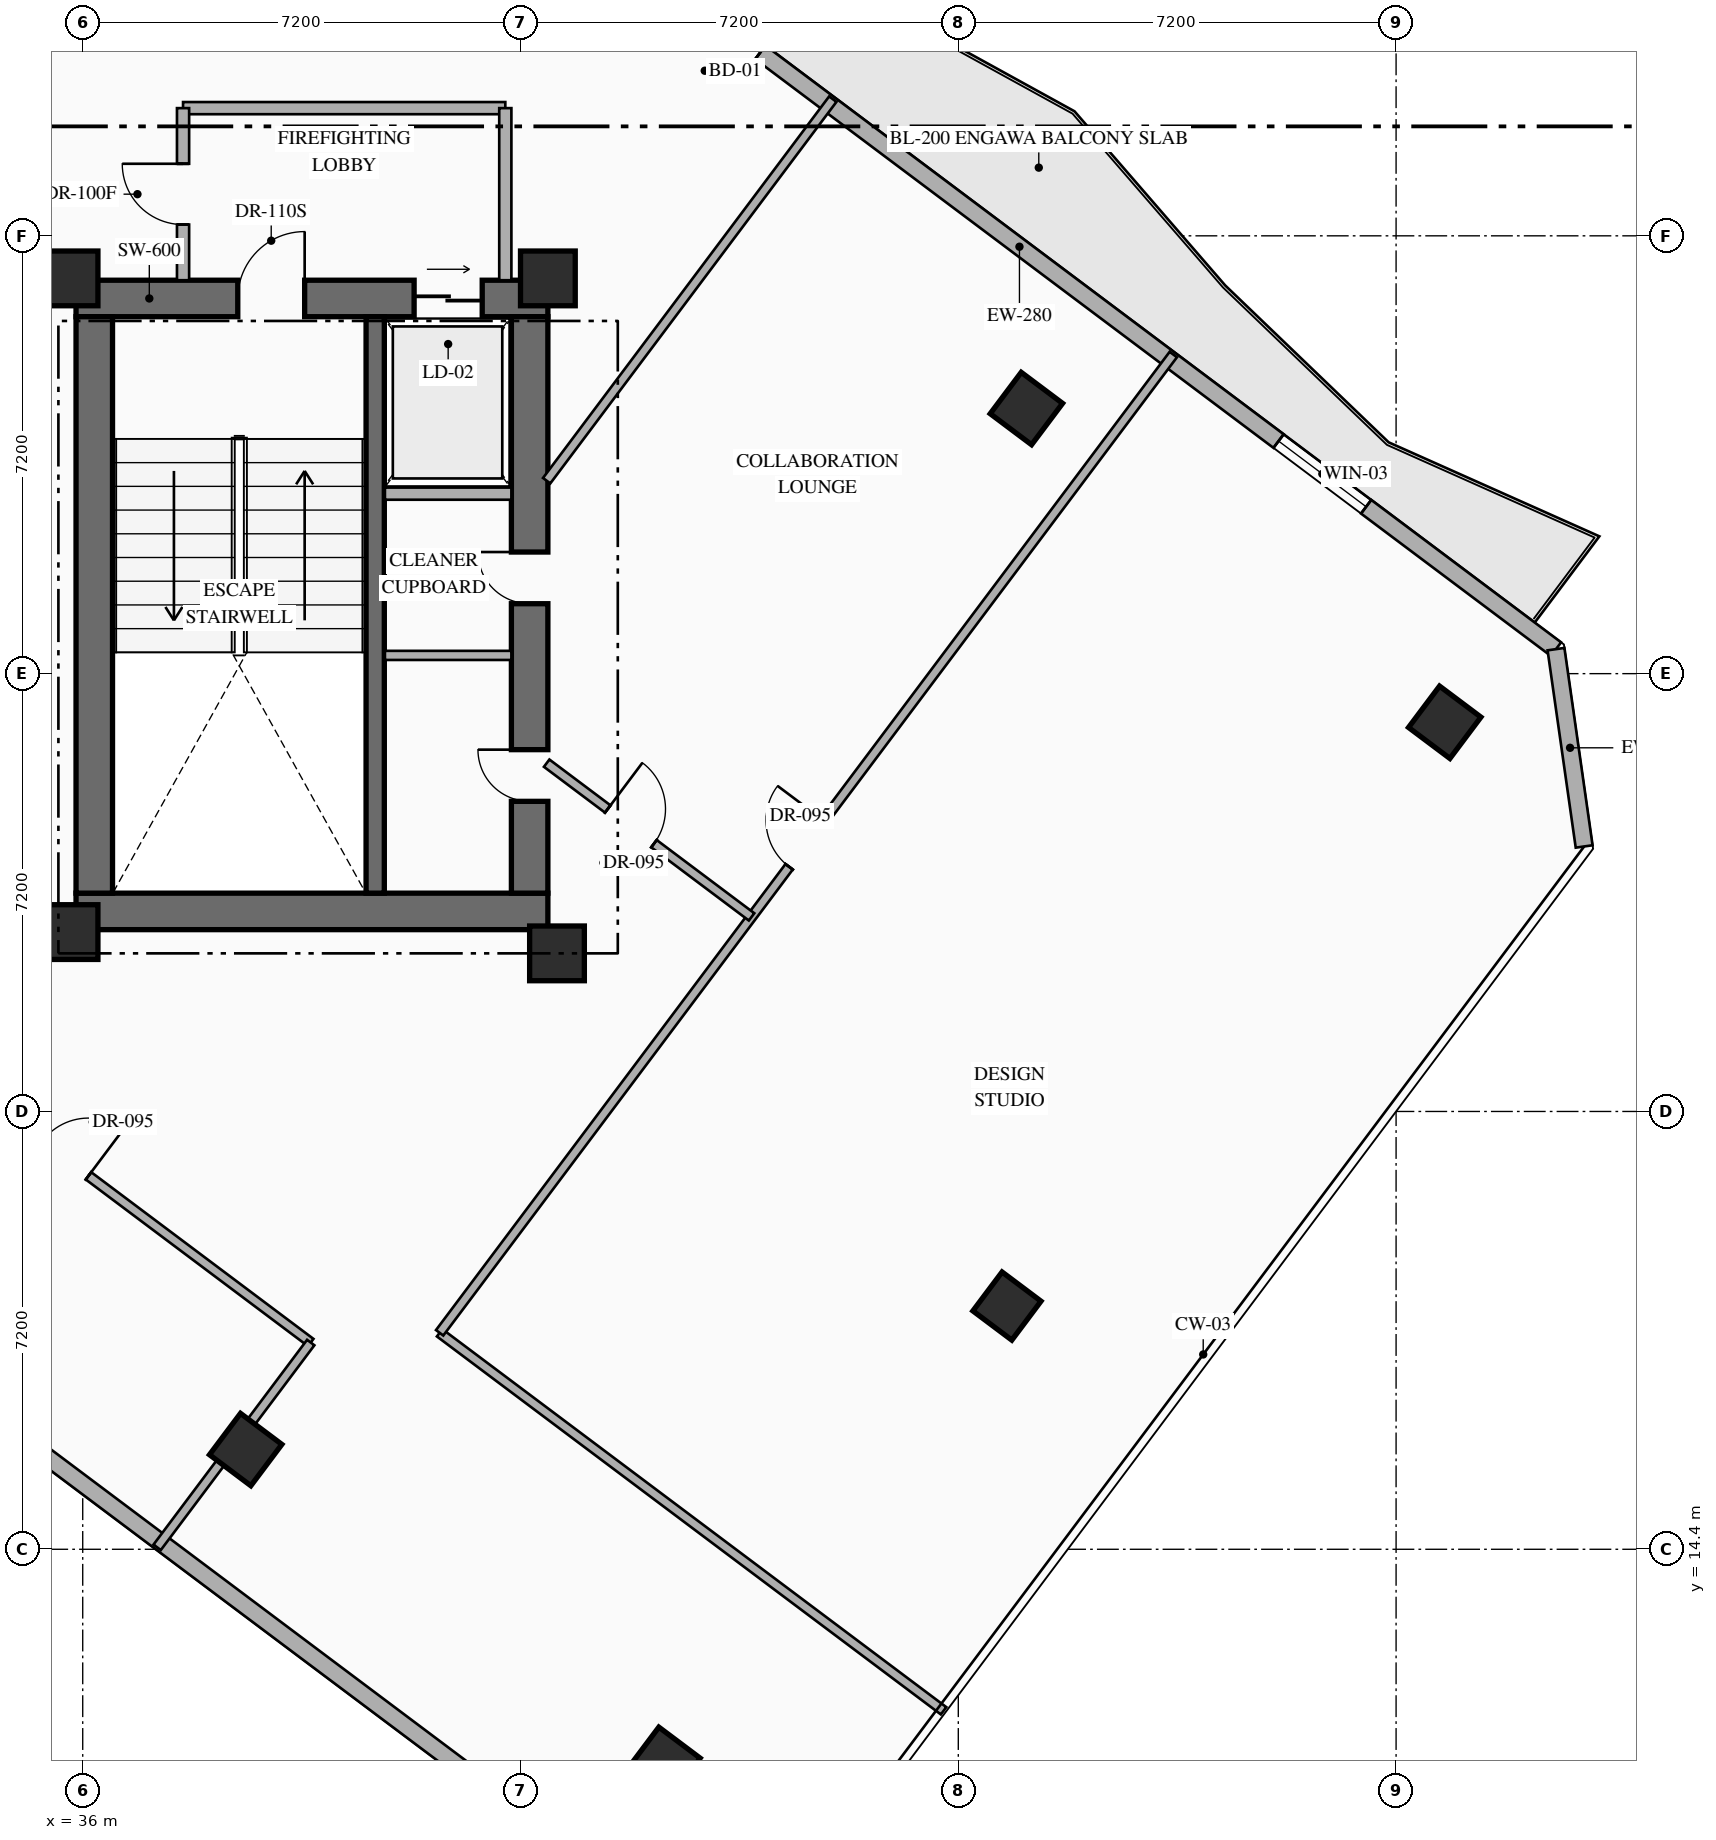
"""IFC4 building model, lengths in metres.
Left out: names, types, materials, properties, quantities, classifications, styles, units other than length and angle.
Written with IfcOpenShell. Run it as: python <this file> out.ifc"""

import sys

from ifc_helpers import new_model, si_unit, direction, frame, frame_2d, origin, origin_2d, place, context, subcontext, project, spatial, rectangle, hollow_rectangle, extrude, element, fill, save


model = new_model("IFC4")
c1 = context("Model", 3, precision=1e-05, world=origin(), true_north=direction((0.0, 1.0)))
c2 = subcontext(c1, "Body", "Model", "MODEL_VIEW")
j1 = project(units=[si_unit("LENGTHUNIT", "METRE"), si_unit("PLANEANGLEUNIT", "RADIAN")], contexts=[c1])
p1 = place(None, origin())
s1 = spatial("IfcSite", under=j1, at=p1, CompositionType="ELEMENT")
p2 = place(p1, origin())
s2 = spatial("IfcBuilding", under=s1, at=p2, CompositionType="ELEMENT")
p3 = place(p2, frame((0.0, 0.0, 152.85)))
s3 = spatial("IfcBuildingStorey", under=s2, at=p3, CompositionType="ELEMENT", Elevation=152.85)
p4 = place(p3, frame((35.89, 24.89, 0.0), z_axis=(0.0, 0.0, 1.0), x_axis=(1.0, 0.0, 0.0)))
e1 = element("IfcWall", 1, at=p4, inside=s3, PredefinedType="SHEAR", context=c2, shape_type="SweptSolid", body=[
    extrude(rectangle(XDim=7.76, YDim=0.6, at=frame_2d((3.88, 0.0))), origin(), (0.0, 0.0, 1.0), 3.6),
])
p5 = place(p3, frame((35.89, 34.97, 0.0), z_axis=(0.0, 0.0, 1.0), x_axis=(1.0, 0.0, 0.0)))
e2 = element("IfcWall", 2, at=p5, inside=s3, PredefinedType="SHEAR", context=c2, shape_type="SweptSolid", body=[
    extrude(rectangle(XDim=7.76, YDim=0.6, at=frame_2d((3.88, 0.0))), origin(), (0.0, 0.0, 1.0), 3.6),
])
p6 = place(p5, frame((2.66, 0.0, 0.0)))
e3 = element("IfcOpeningElement", 3, at=p6, cuts=e2, PredefinedType="OPENING", context=c2, shape_type="SweptSolid", body=[
    extrude(rectangle(XDim=1.1, YDim=2.2, at=frame_2d((0.55, 1.1))), frame((0.0, 0.31, 0.0), z_axis=(0.0, -1.0, 0.0), x_axis=(1.0, 0.0, 0.0)), (0.0, 0.0, 1.0), 0.62),
])
p7 = place(p5, frame((5.56, 0.0, 0.0)))
e4 = element("IfcOpeningElement", 4, at=p7, cuts=e2, PredefinedType="OPENING", context=c2, shape_type="SweptSolid", body=[
    extrude(rectangle(XDim=1.12, YDim=2.15, at=frame_2d((0.56, 1.075))), frame((0.0, 0.31, 0.0), z_axis=(0.0, -1.0, 0.0), x_axis=(1.0, 0.0, 0.0)), (0.0, 0.0, 1.0), 0.62),
])
p8 = place(p3, frame((36.19, 25.19, 0.0), z_axis=(0.0, 0.0, 1.0), x_axis=(0.0, 1.0, 0.0)))
e5 = element("IfcWall", 5, at=p8, inside=s3, PredefinedType="SHEAR", context=c2, shape_type="SweptSolid", body=[
    extrude(rectangle(XDim=9.48, YDim=0.6, at=frame_2d((4.74, 0.0))), origin(), (0.0, 0.0, 1.0), 3.6),
])
p9 = place(p3, frame((43.35, 25.19, 0.0), z_axis=(0.0, 0.0, 1.0), x_axis=(0.0, 1.0, 0.0)))
e6 = element("IfcWall", 6, at=p9, inside=s3, PredefinedType="SHEAR", context=c2, shape_type="SweptSolid", body=[
    extrude(rectangle(XDim=9.48, YDim=0.6, at=frame_2d((4.74, 0.0))), origin(), (0.0, 0.0, 1.0), 3.6),
])
p10 = place(p9, frame((1.51, 0.0, 0.0)))
e7 = element("IfcOpeningElement", 7, at=p10, cuts=e6, PredefinedType="OPENING", context=c2, shape_type="SweptSolid", body=[
    extrude(rectangle(XDim=0.85, YDim=2.08, at=frame_2d((0.425, 1.04))), frame((0.0, 0.31, 0.0), z_axis=(0.0, -1.0, 0.0), x_axis=(1.0, 0.0, 0.0)), (0.0, 0.0, 1.0), 0.62),
])
p11 = place(p9, frame((4.76, 0.0, 0.0)))
e8 = element("IfcOpeningElement", 8, at=p11, cuts=e6, PredefinedType="OPENING", context=c2, shape_type="SweptSolid", body=[
    extrude(rectangle(XDim=0.85, YDim=2.08, at=frame_2d((0.425, 1.04))), frame((0.0, 0.31, 0.0), z_axis=(0.0, -1.0, 0.0), x_axis=(1.0, 0.0, 0.0)), (0.0, 0.0, 1.0), 0.62),
])
p12 = place(p3, frame((40.81, 25.19, 0.0), z_axis=(0.0, 0.0, 1.0), x_axis=(0.0, 1.0, 0.0)))
e9 = element("IfcWall", 9, at=p12, inside=s3, PredefinedType="SHEAR", context=c2, shape_type="SweptSolid", body=[
    extrude(rectangle(XDim=9.48, YDim=0.3, at=frame_2d((4.74, 0.0))), origin(), (0.0, 0.0, 1.0), 3.6),
])
for number, where, z_axis, x_axis in (
    (10, (35.8, 24.55, 0.0), (0.0, 0.0, 1.0), (1.0, 0.0, 0.0)),
    (11, (43.8, 24.2, 0.0), (0.0, 0.0, 1.0), (1.0, 0.0, 0.0)),
    (12, (35.8, 35.3, 0.0), (0.0, 0.0, 1.0), (1.0, 0.0, 0.0)),
    (13, (43.65, 35.3, 0.0), (0.0, 0.0, 1.0), (1.0, 0.0, 0.0)),
):
    element("IfcColumn", number, at=place(p3, frame(where, z_axis=z_axis, x_axis=x_axis)), inside=s3, PredefinedType="COLUMN", context=c2, shape_type="SweptSolid", body=[
        extrude(rectangle(XDim=0.9, YDim=0.9, at=origin_2d()), origin(), (0.0, 0.0, 1.0), 3.6),
    ])
for number, where, z_axis, x_axis in (
    (14, (38.68, 16.04, 0.0), (0.0, 0.0, 1.0), (0.8, -0.6, 0.0)),
    (15, (51.52, 33.16, 0.0), (0.0, 0.0, 1.0), (0.8, -0.6, 0.0)),
    (16, (45.56, 10.88, 0.0), (0.0, 0.0, 1.0), (0.8, -0.6, 0.0)),
    (17, (58.4, 28.0, 0.0), (0.0, 0.0, 1.0), (0.8, -0.6, 0.0)),
):
    element("IfcColumn", number, at=place(p3, frame(where, z_axis=z_axis, x_axis=x_axis)), inside=s3, PredefinedType="COLUMN", context=c2, shape_type="SweptSolid", body=[
        extrude(hollow_rectangle(XDim=0.85, YDim=0.85, WallThickness=0.032, at=origin_2d()), origin(), (0.0, 0.0, 1.0), 3.6),
    ])
p13 = place(p3, frame((51.2, 18.4, 0.0), z_axis=(0.0, 0.0, 1.0), x_axis=(0.799999996291, -0.600000004945, 0.0)))
e18 = element("IfcColumn", 18, at=p13, inside=s3, PredefinedType="COLUMN", context=c2, shape_type="SweptSolid", body=[
    extrude(hollow_rectangle(XDim=0.8, YDim=0.8, WallThickness=0.032, at=origin_2d()), origin(), (0.0, 0.0, 1.0), 3.6),
])
p14 = place(p3, frame((44.86, 40.73, 0.0), z_axis=(0.0, 0.0, 1.0), x_axis=(0.800007624502, -0.599989833863, 0.0)))
e19 = element("IfcWall", 19, at=p14, inside=s3, PredefinedType="STANDARD", context=c2, shape_type="SweptSolid", body=[
    extrude(rectangle(XDim=19.212, YDim=0.28, at=frame_2d((9.606, 0.0))), origin(), (0.0, 0.0, 1.0), 3.35),
])
p15 = place(p14, frame((1.755, 0.0, 0.0)))
e20 = element("IfcOpeningElement", 20, at=p15, cuts=e19, PredefinedType="OPENING", context=c2, shape_type="SweptSolid", body=[
    extrude(rectangle(XDim=1.1, YDim=2.2, at=frame_2d((0.55, 1.1))), frame((0.0, 0.15, 0.0), z_axis=(0.0, -1.0, 0.0), x_axis=(1.0, 0.0, 0.0)), (0.0, 0.0, 1.0), 0.3),
])
p16 = place(p14, frame((13.509, 0.0, 0.85)))
e21 = element("IfcOpeningElement", 21, at=p16, cuts=e19, PredefinedType="OPENING", context=c2, shape_type="SweptSolid", body=[
    extrude(rectangle(XDim=1.8, YDim=2.1, at=frame_2d((0.9, 1.05))), frame((0.0, 0.15, 0.0), z_axis=(0.0, -1.0, 0.0), x_axis=(1.0, 0.0, 0.0)), (0.0, 0.0, 1.0), 0.3),
])
p17 = place(p3, frame((60.23, 29.203, 0.0), z_axis=(0.0, 0.0, 1.0), x_axis=(0.141296221922, -0.989967361922, 0.0)))
e22 = element("IfcWall", 22, at=p17, inside=s3, PredefinedType="STANDARD", context=c2, shape_type="SweptSolid", body=[
    extrude(rectangle(XDim=3.278, YDim=0.28, at=frame_2d((1.639, 0.0))), origin(), (0.0, 0.0, 1.0), 3.35),
])
p18 = place(p3, frame((44.918, 8.787, 0.0), z_axis=(0.0, 0.0, 1.0), x_axis=(-0.800004765927, 0.599993645378, 0.0)))
e23 = element("IfcWall", 23, at=p18, inside=s3, PredefinedType="STANDARD", context=c2, shape_type="SweptSolid", body=[
    extrude(rectangle(XDim=24.588, YDim=0.28, at=frame_2d((12.294, 0.0))), origin(), (0.0, 0.0, 1.0), 3.35),
])
p19 = place(p3, frame((40.97, 31.76, 0.0), z_axis=(0.0, 0.0, 1.0), x_axis=(1.0, 0.0, 0.0)))
e24 = element("IfcWall", 24, at=p19, inside=s3, PredefinedType="STANDARD", context=c2, shape_type="SweptSolid", body=[
    extrude(rectangle(XDim=2.08, YDim=0.2, at=frame_2d((1.04, 0.0))), origin(), (0.0, 0.0, 1.0), 3.35),
])
p20 = place(p3, frame((40.97, 29.1, 0.0), z_axis=(0.0, 0.0, 1.0), x_axis=(1.0, 0.0, 0.0)))
e25 = element("IfcWall", 25, at=p20, inside=s3, PredefinedType="PARTITIONING", context=c2, shape_type="SweptSolid", body=[
    extrude(rectangle(XDim=2.08, YDim=0.15, at=frame_2d((1.04, 0.0))), origin(), (0.0, 0.0, 1.0), 3.35),
])
p21 = place(p3, frame((37.65, 38.1, 0.0), z_axis=(0.0, 0.0, 1.0), x_axis=(1.0, 0.0, 0.0)))
e26 = element("IfcWall", 26, at=p21, inside=s3, PredefinedType="STANDARD", context=c2, shape_type="SweptSolid", body=[
    extrude(rectangle(XDim=5.3, YDim=0.2, at=frame_2d((2.65, 0.0))), origin(), (0.0, 0.0, 1.0), 3.35),
])
p22 = place(p3, frame((42.95, 35.27, 0.0), z_axis=(0.0, 0.0, 1.0), x_axis=(0.0, 1.0, 0.0)))
e27 = element("IfcWall", 27, at=p22, inside=s3, PredefinedType="STANDARD", context=c2, shape_type="SweptSolid", body=[
    extrude(rectangle(XDim=2.83, YDim=0.2, at=frame_2d((1.415, 0.0))), origin(), (0.0, 0.0, 1.0), 3.35),
])
p23 = place(p3, frame((37.65, 35.27, 0.0), z_axis=(0.0, 0.0, 1.0), x_axis=(0.0, 1.0, 0.0)))
e28 = element("IfcWall", 28, at=p23, inside=s3, PredefinedType="STANDARD", context=c2, shape_type="SweptSolid", body=[
    extrude(rectangle(XDim=2.83, YDim=0.2, at=frame_2d((1.415, 0.0))), origin(), (0.0, 0.0, 1.0), 3.35),
])
p24 = place(p23, frame((0.915, 0.0, 0.0)))
e29 = element("IfcOpeningElement", 29, at=p24, cuts=e28, PredefinedType="OPENING", context=c2, shape_type="SweptSolid", body=[
    extrude(rectangle(XDim=1.0, YDim=2.2, at=frame_2d((0.5, 1.1))), frame((0.0, 0.11, 0.0), z_axis=(0.0, -1.0, 0.0), x_axis=(1.0, 0.0, 0.0)), (0.0, 0.0, 1.0), 0.22),
])
p25 = place(p3, frame((41.87, 17.96, 0.0), z_axis=(0.0, 0.0, 1.0), x_axis=(0.799991516197, -0.600011311571, 0.0)))
e30 = element("IfcWall", 30, at=p25, inside=s3, PredefinedType="PARTITIONING", context=c2, shape_type="SweptSolid", body=[
    extrude(rectangle(XDim=10.36, YDim=0.15, at=frame_2d((5.18, 0.0))), origin(), (0.0, 0.0, 1.0), 3.35),
])
p26 = place(p3, frame((41.87, 17.96, 0.0), z_axis=(0.0, 0.0, 1.0), x_axis=(0.599994172676, 0.80000437046, 0.0)))
e31 = element("IfcWall", 31, at=p26, inside=s3, PredefinedType="PARTITIONING", context=c2, shape_type="SweptSolid", body=[
    extrude(rectangle(XDim=20.11, YDim=0.15, at=frame_2d((10.055, 0.0))), origin(), (0.0, 0.0, 1.0), 3.35),
])
p27 = place(p26, frame((9.58, 0.0, 0.0)))
e32 = element("IfcOpeningElement", 32, at=p27, cuts=e31, PredefinedType="OPENING", context=c2, shape_type="SweptSolid", body=[
    extrude(rectangle(XDim=0.95, YDim=2.15, at=frame_2d((0.475, 1.075))), frame((0.0, 0.085, 0.0), z_axis=(0.0, -1.0, 0.0), x_axis=(1.0, 0.0, 0.0)), (0.0, 0.0, 1.0), 0.17),
])
p28 = place(p3, frame((43.63, 27.328, 0.0), z_axis=(0.0, 0.0, 1.0), x_axis=(0.799972182084, -0.600037088764, 0.0)))
e33 = element("IfcWall", 33, at=p28, inside=s3, PredefinedType="PARTITIONING", context=c2, shape_type="SweptSolid", body=[
    extrude(rectangle(XDim=4.213, YDim=0.15, at=frame_2d((2.106, 0.0))), origin(), (0.0, 0.0, 1.0), 3.045),
])
p29 = place(p28, frame((1.256, 0.0, 0.0)))
e34 = element("IfcOpeningElement", 34, at=p29, cuts=e33, PredefinedType="OPENING", context=c2, shape_type="SweptSolid", body=[
    extrude(rectangle(XDim=0.95, YDim=2.15, at=frame_2d((0.475, 1.075))), frame((0.0, 0.085, 0.0), z_axis=(0.0, -1.0, 0.0), x_axis=(1.0, 0.0, 0.0)), (0.0, 0.0, 1.0), 0.17),
])
p30 = place(p3, frame((43.63, 31.973, 0.0), z_axis=(0.0, 0.0, 1.0), x_axis=(0.599975099311, 0.800018674911, 0.0)))
e35 = element("IfcWall", 35, at=p30, inside=s3, PredefinedType="PARTITIONING", context=c2, shape_type="SweptSolid", body=[
    extrude(rectangle(XDim=7.844, YDim=0.15, at=frame_2d((3.922, 0.0))), origin(), (0.0, 0.0, 1.0), 3.35),
])
p31 = place(p3, frame((27.91, 26.68, 0.0), z_axis=(0.0, 0.0, 1.0), x_axis=(0.800005938517, -0.599992081896, 0.0)))
e36 = element("IfcWall", 36, at=p31, inside=s3, PredefinedType="PARTITIONING", context=c2, shape_type="SweptSolid", body=[
    extrude(rectangle(XDim=14.8, YDim=0.15, at=frame_2d((7.4, 0.0))), origin(), (0.0, 0.0, 1.0), 3.35),
])
p32 = place(p31, frame((9.281, 0.0, 0.0)))
e37 = element("IfcOpeningElement", 37, at=p32, cuts=e36, PredefinedType="OPENING", context=c2, shape_type="SweptSolid", body=[
    extrude(rectangle(XDim=0.95, YDim=2.15, at=frame_2d((0.475, 1.075))), frame((0.0, 0.085, 0.0), z_axis=(0.0, -1.0, 0.0), x_axis=(1.0, 0.0, 0.0)), (0.0, 0.0, 1.0), 0.17),
])
p33 = place(p3, frame((37.224, 14.432, 0.0), z_axis=(0.0, 0.0, 1.0), x_axis=(0.599962885857, 0.800027834262, 0.0)))
e38 = element("IfcWall", 38, at=p33, inside=s3, PredefinedType="PARTITIONING", context=c2, shape_type="SweptSolid", body=[
    extrude(rectangle(XDim=4.21, YDim=0.15, at=frame_2d((2.105, 0.0))), origin(), (0.0, 0.0, 1.0), 2.695),
])
p34 = place(p15, origin())
e39 = element("IfcDoor", 39, at=p34, inside=s3, OperationType="SINGLE_SWING_LEFT", PredefinedType="DOOR", context=c2, shape_type="SweptSolid", body=[
    extrude(rectangle(XDim=1.1, YDim=2.2, at=frame_2d((0.55, 1.1))), frame((0.0, 0.025, 0.0), z_axis=(0.0, -1.0, 0.0), x_axis=(1.0, 0.0, 0.0)), (0.0, 0.0, 1.0), 0.05),
])
fill(e20, e39)
p35 = place(p16, origin())
e40 = element("IfcWindow", 40, at=p35, inside=s3, PartitioningType="SINGLE_PANEL", PredefinedType="WINDOW", context=c2, shape_type="SweptSolid", body=[
    extrude(rectangle(XDim=1.8, YDim=2.1, at=frame_2d((0.9, 1.05))), frame((0.0, 0.03, 0.0), z_axis=(0.0, -1.0, 0.0), x_axis=(1.0, 0.0, 0.0)), (0.0, 0.0, 1.0), 0.06),
])
fill(e21, e40)
p36 = place(p6, origin())
e41 = element("IfcDoor", 41, at=p36, inside=s3, OperationType="SINGLE_SWING_RIGHT", PredefinedType="DOOR", context=c2, shape_type="SweptSolid", body=[
    extrude(rectangle(XDim=1.1, YDim=2.2, at=frame_2d((0.55, 1.1))), frame((0.0, 0.025, 0.0), z_axis=(0.0, -1.0, 0.0), x_axis=(1.0, 0.0, 0.0)), (0.0, 0.0, 1.0), 0.05),
])
fill(e3, e41)
p37 = place(p7, origin())
e42 = element("IfcDoor", 42, at=p37, inside=s3, OperationType="SLIDING_TO_RIGHT", PredefinedType="USERDEFINED", context=c2, shape_type="SweptSolid", body=[
    extrude(rectangle(XDim=1.12, YDim=2.15, at=frame_2d((0.56, 1.075))), frame((0.0, 0.025, 0.0), z_axis=(0.0, -1.0, 0.0), x_axis=(1.0, 0.0, 0.0)), (0.0, 0.0, 1.0), 0.05),
])
fill(e4, e42)
p38 = place(p10, origin())
e43 = element("IfcDoor", 43, at=p38, inside=s3, OperationType="SINGLE_SWING_RIGHT", PredefinedType="DOOR", context=c2, shape_type="SweptSolid", body=[
    extrude(rectangle(XDim=0.85, YDim=2.08, at=frame_2d((0.425, 1.04))), frame((0.0, 0.025, 0.0), z_axis=(0.0, -1.0, 0.0), x_axis=(1.0, 0.0, 0.0)), (0.0, 0.0, 1.0), 0.05),
])
fill(e7, e43)
p39 = place(p11, origin())
e44 = element("IfcDoor", 44, at=p39, inside=s3, OperationType="SINGLE_SWING_RIGHT", PredefinedType="DOOR", context=c2, shape_type="SweptSolid", body=[
    extrude(rectangle(XDim=0.85, YDim=2.08, at=frame_2d((0.425, 1.04))), frame((0.0, 0.025, 0.0), z_axis=(0.0, -1.0, 0.0), x_axis=(1.0, 0.0, 0.0)), (0.0, 0.0, 1.0), 0.05),
])
fill(e8, e44)
p40 = place(p24, origin())
e45 = element("IfcDoor", 45, at=p40, inside=s3, OperationType="SINGLE_SWING_RIGHT", PredefinedType="DOOR", context=c2, shape_type="SweptSolid", body=[
    extrude(rectangle(XDim=1.0, YDim=2.2, at=frame_2d((0.5, 1.1))), frame((0.0, 0.025, 0.0), z_axis=(0.0, -1.0, 0.0), x_axis=(1.0, 0.0, 0.0)), (0.0, 0.0, 1.0), 0.05),
])
fill(e29, e45)
p41 = place(p27, origin())
e46 = element("IfcDoor", 46, at=p41, inside=s3, OperationType="SINGLE_SWING_RIGHT", PredefinedType="DOOR", context=c2, shape_type="SweptSolid", body=[
    extrude(rectangle(XDim=0.95, YDim=2.15, at=frame_2d((0.475, 1.075))), frame((0.0, 0.025, 0.0), z_axis=(0.0, -1.0, 0.0), x_axis=(1.0, 0.0, 0.0)), (0.0, 0.0, 1.0), 0.05),
])
fill(e32, e46)
p42 = place(p29, origin())
e47 = element("IfcDoor", 47, at=p42, inside=s3, OperationType="SINGLE_SWING_LEFT", PredefinedType="DOOR", context=c2, shape_type="SweptSolid", body=[
    extrude(rectangle(XDim=0.95, YDim=2.15, at=frame_2d((0.475, 1.075))), frame((0.0, 0.025, 0.0), z_axis=(0.0, -1.0, 0.0), x_axis=(1.0, 0.0, 0.0)), (0.0, 0.0, 1.0), 0.05),
])
fill(e34, e47)
p43 = place(p32, origin())
e48 = element("IfcDoor", 48, at=p43, inside=s3, OperationType="SINGLE_SWING_RIGHT", PredefinedType="DOOR", context=c2, shape_type="SweptSolid", body=[
    extrude(rectangle(XDim=0.95, YDim=2.15, at=frame_2d((0.475, 1.075))), frame((0.0, 0.025, 0.0), z_axis=(0.0, -1.0, 0.0), x_axis=(1.0, 0.0, 0.0)), (0.0, 0.0, 1.0), 0.05),
])
fill(e37, e48)
save(model, sys.argv[1])
